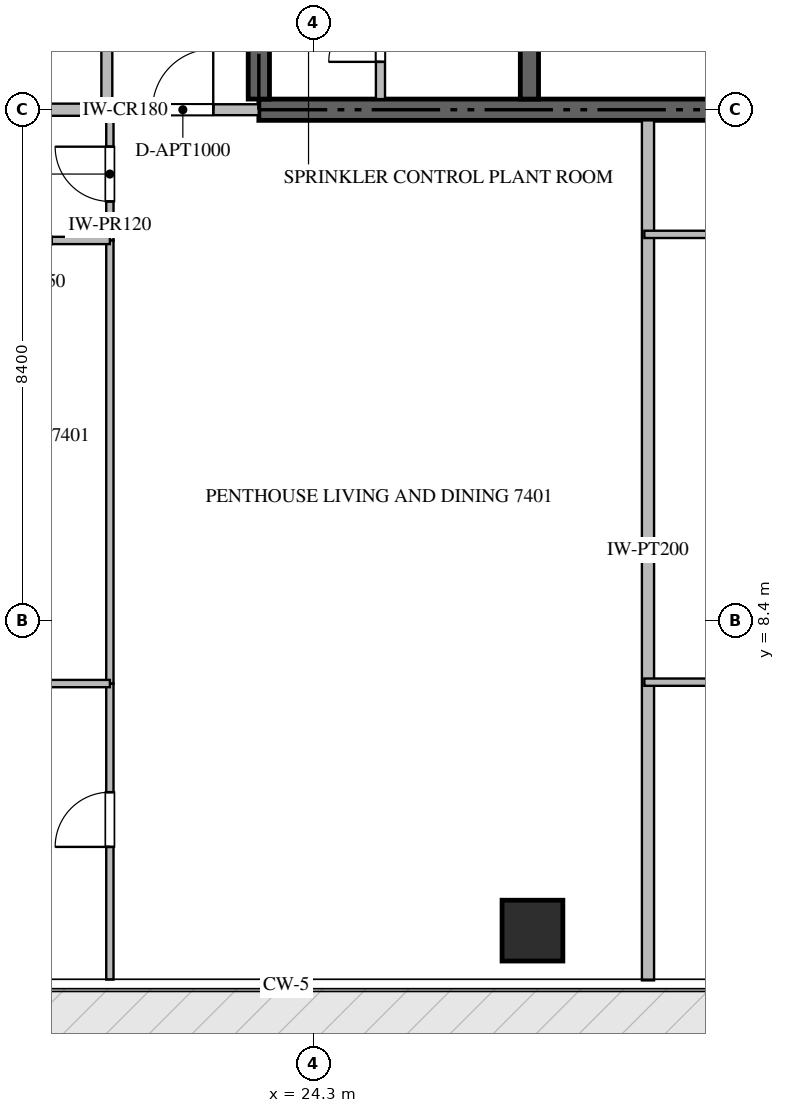
"""IFC4 building model, lengths in metres.
Left out: names, types, materials, properties, quantities, classifications, styles, units other than length and angle.
Written with IfcOpenShell. Run it as: python <this file> out.ifc"""

import sys

from ifc_helpers import new_model, si_unit, direction, frame, frame_2d, origin, origin_2d, place, context, subcontext, project, spatial, rectangle, extrude, source, transform, mapped, element, fill, save


model = new_model("IFC4")
c1 = context("Model", 3, precision=1e-05, world=origin(), true_north=direction((0.0, 1.0)))
c2 = subcontext(c1, "Body", "Model", "MODEL_VIEW")
j1 = project(units=[si_unit("LENGTHUNIT", "METRE"), si_unit("PLANEANGLEUNIT", "RADIAN")], contexts=[c1])
p1 = place(None, origin())
s1 = spatial("IfcSite", under=j1, at=p1, CompositionType="ELEMENT")
p2 = place(p1, origin())
s2 = spatial("IfcBuilding", under=s1, at=p2, CompositionType="ELEMENT")
p3 = place(p2, frame((0.0, 0.0, 297.5)))
s3 = spatial("IfcBuildingStorey", under=s2, at=p3, CompositionType="ELEMENT", Elevation=297.5)
p4 = place(p3, frame((23.4, 16.8, -0.26), z_axis=(0.0, 0.0, 1.0), x_axis=(1.0, 0.0, 0.0)))
e1 = element("IfcWall", 1, at=p4, inside=s3, PredefinedType="SHEAR", context=c2, shape_type="SweptSolid", body=[
    extrude(rectangle(XDim=18.0, YDim=0.35, at=frame_2d((9.0, 0.0))), origin(), (0.0, 0.0, 1.0), 4.048),
])
p5 = place(p3, frame((23.4, 16.975, -0.26), z_axis=(0.0, 0.0, 1.0), x_axis=(0.0, 1.0, 0.0)))
e2 = element("IfcWall", 2, at=p5, inside=s3, PredefinedType="SHEAR", context=c2, shape_type="SweptSolid", body=[
    extrude(rectangle(XDim=4.875, YDim=0.35, at=frame_2d((2.438, 0.0))), origin(), (0.0, 0.0, 1.0), 4.048),
])
p6 = place(p3, frame((27.85, 16.975, -0.26), z_axis=(0.0, 0.0, 1.0), x_axis=(0.0, 1.0, 0.0)))
e3 = element("IfcWall", 3, at=p6, inside=s3, PredefinedType="SHEAR", context=c2, shape_type="SweptSolid", body=[
    extrude(rectangle(XDim=4.875, YDim=0.3, at=frame_2d((2.438, 0.0))), origin(), (0.0, 0.0, 1.0), 4.048),
])
m1 = source(origin(), c2, "Body", "SweptSolid", [
    extrude(rectangle(XDim=1.0, YDim=1.0, at=origin_2d()), origin(), (0.0, 0.0, 1.0), 4.05),
])
p7 = place(p3, frame((27.9, 3.3, -0.26), z_axis=(0.0, 0.0, 1.0), x_axis=(1.0, 0.0, 0.0)))
e4 = element("IfcColumn", 4, at=p7, inside=s3, PredefinedType="COLUMN", context=c2, shape_type="MappedRepresentation", body=[
    mapped(m1, transform((0.0, 0.0, 0.0), scale=1.0)),
])
p8 = place(p3, frame((25.4, 16.975, 0.0), z_axis=(0.0, 0.0, 1.0), x_axis=(0.0, 1.0, 0.0)))
e5 = element("IfcWall", 5, at=p8, inside=s3, PredefinedType="PARTITIONING", context=c2, shape_type="SweptSolid", body=[
    extrude(rectangle(XDim=2.075, YDim=0.15, at=frame_2d((1.038, 0.0))), origin(), (0.0, 0.0, 1.0), 3.79),
])
p9 = place(p8, frame((0.612, 0.0, 0.0)))
e6 = element("IfcOpeningElement", 6, at=p9, cuts=e5, PredefinedType="OPENING", context=c2, shape_type="SweptSolid", body=[
    extrude(rectangle(XDim=0.85, YDim=2.1, at=frame_2d((0.425, 1.05))), frame((0.0, 0.085, 0.0), z_axis=(0.0, -1.0, 0.0), x_axis=(1.0, 0.0, 0.0)), (0.0, 0.0, 1.0), 0.17),
])
p10 = place(p3, frame((29.8, 2.482, 0.0), z_axis=(0.0, 0.0, 1.0), x_axis=(0.0, 1.0, 0.0)))
e7 = element("IfcWall", 7, at=p10, inside=s3, PredefinedType="PARTITIONING", context=c2, shape_type="SweptSolid", body=[
    extrude(rectangle(XDim=14.143, YDim=0.2, at=frame_2d((7.072, 0.0))), origin(), (0.0, 0.0, 1.0), 3.79),
])
p11 = place(p3, frame((9.282, 16.8, 0.0), z_axis=(0.0, 0.0, 1.0), x_axis=(1.0, 0.0, 0.0)))
e8 = element("IfcWall", 8, at=p11, inside=s3, PredefinedType="PARTITIONING", context=c2, shape_type="SweptSolid", body=[
    extrude(rectangle(XDim=11.618, YDim=0.2, at=frame_2d((5.809, 0.0))), origin(), (0.0, 0.0, 1.0), 3.79),
])
p12 = place(p3, frame((20.902, 16.8, 0.0), z_axis=(0.0, 0.0, 1.0), x_axis=(1.0, 0.0, 0.0)))
e9 = element("IfcWall", 9, at=p12, inside=s3, PredefinedType="PARTITIONING", context=c2, shape_type="SweptSolid", body=[
    extrude(rectangle(XDim=2.496, YDim=0.18, at=frame_2d((1.248, 0.0))), origin(), (0.0, 0.0, 1.0), 3.79),
])
p13 = place(p12, frame((0.748, 0.0, 0.0)))
e10 = element("IfcOpeningElement", 10, at=p13, cuts=e9, PredefinedType="OPENING", context=c2, shape_type="SweptSolid", body=[
    extrude(rectangle(XDim=1.0, YDim=2.15, at=frame_2d((0.5, 1.075))), frame((0.0, 0.1, 0.0), z_axis=(0.0, -1.0, 0.0), x_axis=(1.0, 0.0, 0.0)), (0.0, 0.0, 1.0), 0.2),
])
p14 = place(p3, frame((20.9, 16.8, 0.0), z_axis=(0.0, 0.0, 1.0), x_axis=(0.0, 1.0, 0.0)))
e11 = element("IfcWall", 11, at=p14, inside=s3, PredefinedType="PARTITIONING", context=c2, shape_type="SweptSolid", body=[
    extrude(rectangle(XDim=16.8, YDim=0.18, at=frame_2d((8.4, 0.0))), origin(), (0.0, 0.0, 1.0), 3.79),
])
p15 = place(p14, frame((14.5, 0.0, 0.0)))
e12 = element("IfcOpeningElement", 12, at=p15, cuts=e11, PredefinedType="OPENING", context=c2, shape_type="SweptSolid", body=[
    extrude(rectangle(XDim=1.0, YDim=2.15, at=frame_2d((0.5, 1.075))), frame((0.0, 0.1, 0.0), z_axis=(0.0, -1.0, 0.0), x_axis=(1.0, 0.0, 0.0)), (0.0, 0.0, 1.0), 0.2),
])
p16 = place(p3, frame((20.95, 14.65, 0.0), z_axis=(0.0, 0.0, 1.0), x_axis=(0.0, 1.0, 0.0)))
e13 = element("IfcWall", 13, at=p16, inside=s3, PredefinedType="PARTITIONING", context=c2, shape_type="SweptSolid", body=[
    extrude(rectangle(XDim=2.148, YDim=0.12, at=frame_2d((1.074, 0.0))), origin(), (0.0, 0.0, 1.0), 3.79),
])
p17 = place(p16, frame((0.642, 0.0, 0.0)))
e14 = element("IfcOpeningElement", 14, at=p17, cuts=e13, PredefinedType="OPENING", context=c2, shape_type="SweptSolid", body=[
    extrude(rectangle(XDim=0.9, YDim=2.1, at=frame_2d((0.45, 1.05))), frame((0.0, 0.07, 0.0), z_axis=(0.0, -1.0, 0.0), x_axis=(1.0, 0.0, 0.0)), (0.0, 0.0, 1.0), 0.14),
])
p18 = place(p3, frame((20.95, 2.495, 0.0), z_axis=(0.0, 0.0, 1.0), x_axis=(0.0, 1.0, 0.0)))
e15 = element("IfcWall", 15, at=p18, inside=s3, PredefinedType="PARTITIONING", context=c2, shape_type="SweptSolid", body=[
    extrude(rectangle(XDim=4.868, YDim=0.12, at=frame_2d((2.434, 0.0))), origin(), (0.0, 0.0, 1.0), 3.79),
])
p19 = place(p18, frame((2.182, 0.0, 0.0)))
e16 = element("IfcOpeningElement", 16, at=p19, cuts=e15, PredefinedType="OPENING", context=c2, shape_type="SweptSolid", body=[
    extrude(rectangle(XDim=0.9, YDim=2.1, at=frame_2d((0.45, 1.05))), frame((0.0, 0.07, 0.0), z_axis=(0.0, -1.0, 0.0), x_axis=(1.0, 0.0, 0.0)), (0.0, 0.0, 1.0), 0.14),
])
p20 = place(p3, frame((20.95, 7.365, 0.0), z_axis=(0.0, 0.0, 1.0), x_axis=(0.0, 1.0, 0.0)))
e17 = element("IfcWall", 17, at=p20, inside=s3, PredefinedType="PARTITIONING", context=c2, shape_type="SweptSolid", body=[
    extrude(rectangle(XDim=7.283, YDim=0.12, at=frame_2d((3.642, 0.0))), origin(), (0.0, 0.0, 1.0), 3.79),
])
p21 = place(p3, frame((16.08, 7.363, 0.0), z_axis=(0.0, 0.0, 1.0), x_axis=(1.0, 0.0, 0.0)))
e18 = element("IfcWall", 18, at=p21, inside=s3, PredefinedType="PARTITIONING", context=c2, shape_type="SweptSolid", body=[
    extrude(rectangle(XDim=4.87, YDim=0.12, at=frame_2d((2.435, 0.0))), origin(), (0.0, 0.0, 1.0), 3.79),
])
p22 = place(p3, frame((18.182, 14.65, 0.0), z_axis=(0.0, 0.0, 1.0), x_axis=(1.0, 0.0, 0.0)))
e19 = element("IfcWall", 19, at=p22, inside=s3, PredefinedType="PARTITIONING", context=c2, shape_type="SweptSolid", body=[
    extrude(rectangle(XDim=2.768, YDim=0.12, at=frame_2d((1.384, 0.0))), origin(), (0.0, 0.0, 1.0), 3.79),
])
p23 = place(p22, frame((0.959, 0.0, 0.0)))
e20 = element("IfcOpeningElement", 20, at=p23, cuts=e19, PredefinedType="OPENING", context=c2, shape_type="SweptSolid", body=[
    extrude(rectangle(XDim=0.85, YDim=2.1, at=frame_2d((0.425, 1.05))), frame((0.0, 0.07, 0.0), z_axis=(0.0, -1.0, 0.0), x_axis=(1.0, 0.0, 0.0)), (0.0, 0.0, 1.0), 0.14),
])
for number, where, z_axis, x_axis in (
    (21, (29.74, 7.386, 0.0), (0.0, 0.0, 1.0), (1.0, 0.0, 0.0)),
    (22, (29.74, 14.75, 0.0), (0.0, 0.0, 1.0), (1.0, 0.0, 0.0)),
):
    element("IfcWall", number, at=place(p3, frame(where, z_axis=z_axis, x_axis=x_axis)), inside=s3, PredefinedType="PARTITIONING", context=c2, shape_type="SweptSolid", body=[
        extrude(rectangle(XDim=8.76, YDim=0.12, at=frame_2d((4.38, 0.0))), origin(), (0.0, 0.0, 1.0), 3.79),
    ])
m2 = source(origin(), c2, "Body", "SweptSolid", [
    extrude(rectangle(XDim=0.85, YDim=2.1, at=frame_2d((0.425, 1.05))), frame((0.0, 0.025, 0.0), z_axis=(0.0, -1.0, 0.0), x_axis=(1.0, 0.0, 0.0)), (0.0, 0.0, 1.0), 0.05),
])
p24 = place(p9, origin())
e23 = element("IfcDoor", 23, at=p24, inside=s3, OperationType="SINGLE_SWING_LEFT", PredefinedType="DOOR", context=c2, shape_type="MappedRepresentation", body=[
    mapped(m2, transform((0.0, 0.0, 0.0), scale=1.0)),
])
fill(e6, e23)
m3 = source(origin(), c2, "Body", "SweptSolid", [
    extrude(rectangle(XDim=1.0, YDim=2.15, at=frame_2d((0.5, 1.075))), frame((0.0, 0.025, 0.0), z_axis=(0.0, -1.0, 0.0), x_axis=(1.0, 0.0, 0.0)), (0.0, 0.0, 1.0), 0.05),
])
p25 = place(p13, origin())
e24 = element("IfcDoor", 24, at=p25, inside=s3, OperationType="SINGLE_SWING_RIGHT", PredefinedType="DOOR", context=c2, shape_type="MappedRepresentation", body=[
    mapped(m3, transform((0.0, 0.0, 0.0), scale=1.0)),
])
fill(e10, e24)
m4 = source(origin(), c2, "Body", "SweptSolid", [
    extrude(rectangle(XDim=0.9, YDim=2.1, at=frame_2d((0.45, 1.05))), frame((0.0, 0.025, 0.0), z_axis=(0.0, -1.0, 0.0), x_axis=(1.0, 0.0, 0.0)), (0.0, 0.0, 1.0), 0.05),
])
p26 = place(p17, origin())
e25 = element("IfcDoor", 25, at=p26, inside=s3, OperationType="SINGLE_SWING_RIGHT", PredefinedType="DOOR", context=c2, shape_type="MappedRepresentation", body=[
    mapped(m4, transform((0.0, 0.0, 0.0), scale=1.0)),
])
fill(e14, e25)
p27 = place(p19, origin())
e26 = element("IfcDoor", 26, at=p27, inside=s3, OperationType="SINGLE_SWING_LEFT", PredefinedType="DOOR", context=c2, shape_type="MappedRepresentation", body=[
    mapped(m4, transform((0.0, 0.0, 0.0), scale=1.0)),
])
fill(e16, e26)
save(model, sys.argv[1])
